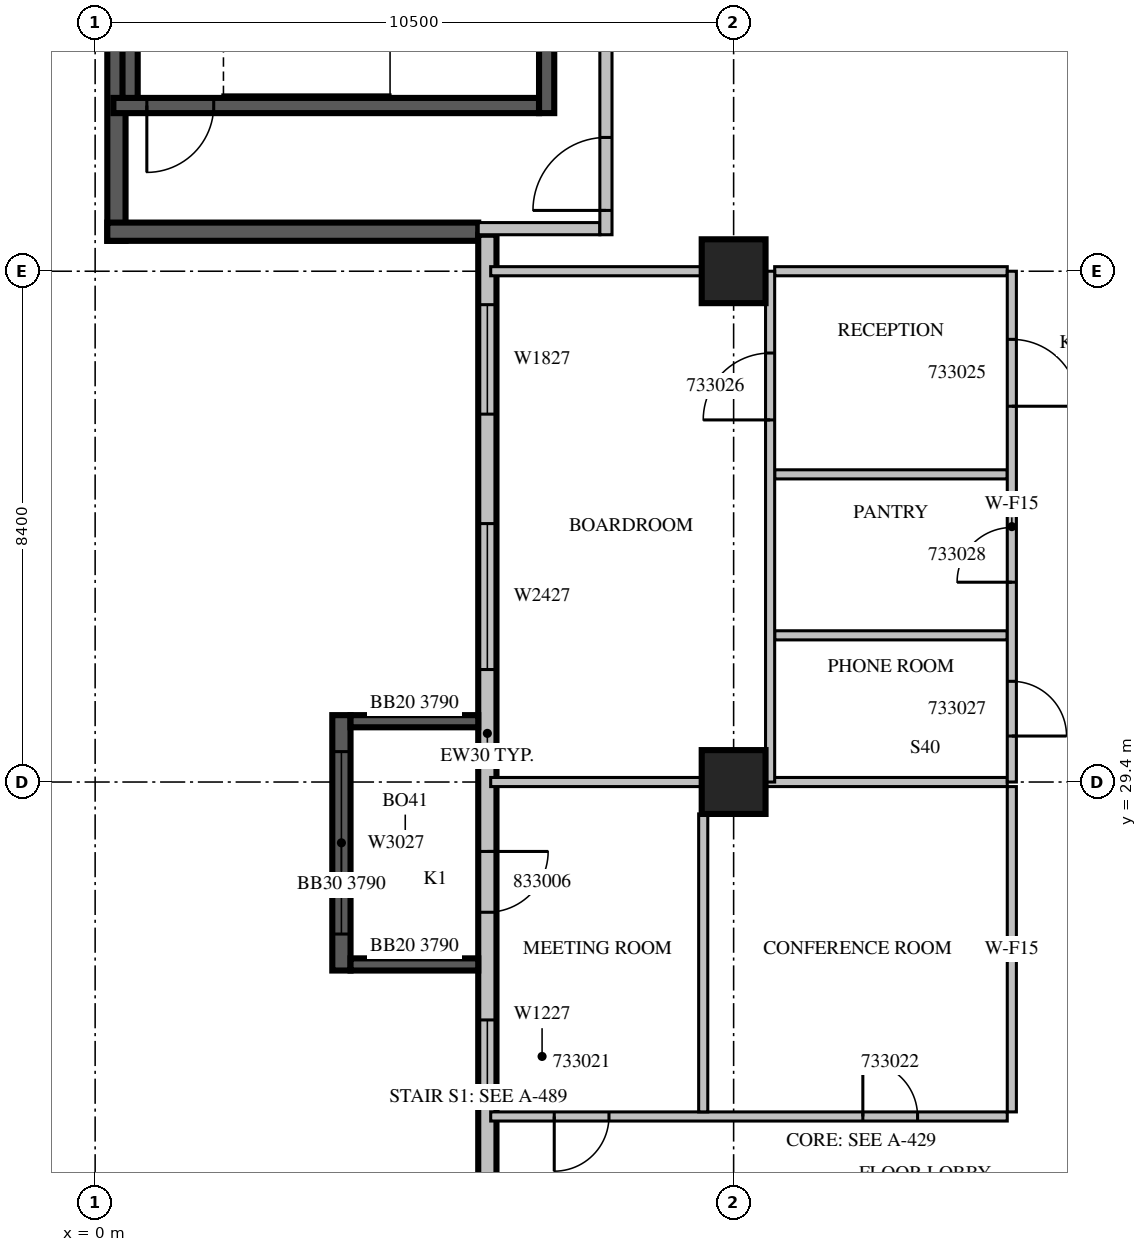
"""IFC4 building model, lengths in metres.
Left out: names, types, materials, properties, quantities, classifications, styles, units other than length and angle.
Written with IfcOpenShell. Run it as: python <this file> out.ifc"""

import sys

from ifc_helpers import new_model, si_unit, direction, frame, frame_2d, origin, origin_2d, place, context, subcontext, project, spatial, rectangle, extrude, source, transform, mapped, element, fill, save


model = new_model("IFC4")
c1 = context("Model", 3, precision=1e-05, world=origin(), true_north=direction((0.0, 1.0)))
c2 = subcontext(c1, "Body", "Model", "MODEL_VIEW")
j1 = project(units=[si_unit("LENGTHUNIT", "METRE"), si_unit("PLANEANGLEUNIT", "RADIAN")], contexts=[c1])
p1 = place(None, origin())
s1 = spatial("IfcSite", under=j1, at=p1, CompositionType="ELEMENT")
p2 = place(p1, origin())
s2 = spatial("IfcBuilding", under=s1, at=p2, CompositionType="ELEMENT")
p3 = place(p2, frame((0.0, 0.0, 149.7)))
s3 = spatial("IfcBuildingStorey", under=s2, at=p3, CompositionType="ELEMENT", Elevation=149.7)
m1 = source(origin(), c2, "Body", "SweptSolid", [
    extrude(rectangle(XDim=1.05, YDim=1.05, at=origin_2d()), origin(), (0.0, 0.0, 1.0), 4.2),
])
for number, where, z_axis, x_axis in (
    (1, (10.5, 29.4, 0.0), (0.0, 0.0, 1.0), (1.0, 0.0, 0.0)),
    (2, (10.5, 37.8, 0.0), (0.0, 0.0, 1.0), (1.0, 0.0, 0.0)),
):
    element("IfcColumn", number, at=place(p3, frame(where, z_axis=z_axis, x_axis=x_axis)), inside=s3, PredefinedType="COLUMN", context=c2, shape_type="MappedRepresentation", body=[
        mapped(m1, transform((0.0, 0.0, 0.0), scale=1.0)),
    ])
m2 = source(origin(), c2, "Body", "SweptSolid", [
    extrude(rectangle(XDim=5.65, YDim=0.3, at=frame_2d((2.825, 0.0))), origin(), (0.0, 0.0, 1.0), 3.8),
])
p4 = place(p3, frame((0.35, 43.95, 0.0), z_axis=(0.0, 0.0, 1.0), x_axis=(0.0, -1.0, 0.0)))
e3 = element("IfcWall", 3, at=p4, inside=s3, PredefinedType="SOLIDWALL", context=c2, shape_type="MappedRepresentation", body=[
    mapped(m2, transform((0.0, 0.0, 0.0), scale=1.0)),
])
m3 = source(origin(), c2, "Body", "SweptSolid", [
    extrude(rectangle(XDim=6.1, YDim=0.3, at=frame_2d((3.05, 0.0))), origin(), (0.0, 0.0, 1.0), 3.8),
])
p5 = place(p3, frame((0.2, 38.45, 0.0), z_axis=(0.0, 0.0, 1.0), x_axis=(1.0, 0.0, 0.0)))
e4 = element("IfcWall", 4, at=p5, inside=s3, PredefinedType="SOLIDWALL", context=c2, shape_type="MappedRepresentation", body=[
    mapped(m3, transform((0.0, 0.0, 0.0), scale=1.0)),
])
m4 = source(origin(), c2, "Body", "SweptSolid", [
    extrude(rectangle(XDim=16.4, YDim=0.3, at=frame_2d((8.2, 0.0))), origin(), (0.0, 0.0, 1.0), 3.8),
])
p6 = place(p3, frame((6.45, 38.4, 0.0), z_axis=(0.0, 0.0, 1.0), x_axis=(0.0, -1.0, 0.0)))
e5 = element("IfcWall", 5, at=p6, inside=s3, PredefinedType="STANDARD", context=c2, shape_type="MappedRepresentation", body=[
    mapped(m4, transform((0.0, 0.0, 0.0), scale=1.0)),
])
m5 = source(origin(), c2, "Body", "SweptSolid", [
    extrude(rectangle(XDim=1.8, YDim=2.7, at=frame_2d((0.9, 1.35))), frame((0.0, 0.16, 0.0), z_axis=(0.0, -1.0, 0.0), x_axis=(1.0, 0.0, 0.0)), (0.0, 0.0, 1.0), 0.32),
])
p7 = place(p6, frame((1.15, 0.0, 0.6)))
e6 = element("IfcOpeningElement", 6, at=p7, cuts=e5, PredefinedType="OPENING", context=c2, shape_type="MappedRepresentation", body=[
    mapped(m5, transform((0.0, 0.0, 0.0), scale=1.0)),
])
m6 = source(origin(), c2, "Body", "SweptSolid", [
    extrude(rectangle(XDim=2.4, YDim=2.7, at=frame_2d((1.2, 1.35))), frame((0.0, 0.16, 0.0), z_axis=(0.0, -1.0, 0.0), x_axis=(1.0, 0.0, 0.0)), (0.0, 0.0, 1.0), 0.32),
])
p8 = place(p6, frame((4.75, 0.0, 0.6)))
e7 = element("IfcOpeningElement", 7, at=p8, cuts=e5, PredefinedType="OPENING", context=c2, shape_type="MappedRepresentation", body=[
    mapped(m6, transform((0.0, 0.0, 0.0), scale=1.0)),
])
m7 = source(origin(), c2, "Body", "SweptSolid", [
    extrude(rectangle(XDim=1.2, YDim=2.7, at=frame_2d((0.6, 1.35))), frame((0.0, 0.16, 0.0), z_axis=(0.0, -1.0, 0.0), x_axis=(1.0, 0.0, 0.0)), (0.0, 0.0, 1.0), 0.32),
])
p9 = place(p6, frame((12.912, 0.0, 0.6)))
e8 = element("IfcOpeningElement", 8, at=p9, cuts=e5, PredefinedType="OPENING", context=c2, shape_type="MappedRepresentation", body=[
    mapped(m7, transform((0.0, 0.0, 0.0), scale=1.0)),
])
m8 = source(origin(), c2, "Body", "SweptSolid", [
    extrude(rectangle(XDim=1.0, YDim=2.1, at=frame_2d((0.5, 1.05))), frame((0.0, 0.16, 0.0), z_axis=(0.0, -1.0, 0.0), x_axis=(1.0, 0.0, 0.0)), (0.0, 0.0, 1.0), 0.32),
])
p10 = place(p6, frame((10.142, 0.0, 0.0)))
e9 = element("IfcOpeningElement", 9, at=p10, cuts=e5, PredefinedType="OPENING", context=c2, shape_type="MappedRepresentation", body=[
    mapped(m8, transform((0.0, 0.0, 0.0), scale=1.0)),
])
m9 = source(origin(), c2, "Body", "SweptSolid", [
    extrude(rectangle(XDim=4.2, YDim=0.3, at=frame_2d((2.1, 0.0))), origin(), (0.0, 0.0, 1.0), 3.79),
])
p11 = place(p3, frame((4.05, 30.5, 0.0), z_axis=(0.0, 0.0, 1.0), x_axis=(0.0, -1.0, 0.0)))
e10 = element("IfcWall", 10, at=p11, inside=s3, PredefinedType="SOLIDWALL", context=c2, shape_type="MappedRepresentation", body=[
    mapped(m9, transform((0.0, 0.0, 0.0), scale=1.0)),
])
m10 = source(origin(), c2, "Body", "SweptSolid", [
    extrude(rectangle(XDim=3.0, YDim=2.7, at=frame_2d((1.5, 1.35))), frame((0.0, 0.16, 0.0), z_axis=(0.0, -1.0, 0.0), x_axis=(1.0, 0.0, 0.0)), (0.0, 0.0, 1.0), 0.32),
])
p12 = place(p11, frame((0.6, 0.0, 0.6)))
e11 = element("IfcOpeningElement", 11, at=p12, cuts=e10, PredefinedType="OPENING", context=c2, shape_type="MappedRepresentation", body=[
    mapped(m10, transform((0.0, 0.0, 0.0), scale=1.0)),
])
m11 = source(origin(), c2, "Body", "SweptSolid", [
    extrude(rectangle(XDim=2.1, YDim=0.2, at=frame_2d((1.05, 0.0))), origin(), (0.0, 0.0, 1.0), 3.79),
])
for number, where, z_axis, x_axis in (
    (12, (6.3, 30.4, 0.0), (0.0, 0.0, 1.0), (-1.0, 0.0, 0.0)),
    (13, (6.3, 26.4, 0.0), (0.0, 0.0, 1.0), (-1.0, 0.0, 0.0)),
):
    element("IfcWall", number, at=place(p3, frame(where, z_axis=z_axis, x_axis=x_axis)), inside=s3, PredefinedType="SOLIDWALL", context=c2, shape_type="MappedRepresentation", body=[
        mapped(m11, transform((0.0, 0.0, 0.0), scale=1.0)),
    ])
m12 = source(origin(), c2, "Body", "SweptSolid", [
    extrude(rectangle(XDim=7.0, YDim=0.25, at=frame_2d((3.5, 0.0))), origin(), (0.0, 0.0, 1.0), 3.8),
])
p13 = place(p3, frame((0.3, 40.525, 0.0), z_axis=(0.0, 0.0, 1.0), x_axis=(1.0, 0.0, 0.0)))
e14 = element("IfcWall", 14, at=p13, inside=s3, PredefinedType="SOLIDWALL", context=c2, shape_type="MappedRepresentation", body=[
    mapped(m12, transform((0.0, 0.0, 0.0), scale=1.0)),
])
m13 = source(origin(), c2, "Body", "SweptSolid", [
    extrude(rectangle(XDim=1.1, YDim=2.1, at=frame_2d((0.55, 1.05))), frame((0.0, 0.135, 0.0), z_axis=(0.0, -1.0, 0.0), x_axis=(1.0, 0.0, 0.0)), (0.0, 0.0, 1.0), 0.27),
])
p14 = place(p13, frame((0.55, 0.0, 0.0)))
e15 = element("IfcOpeningElement", 15, at=p14, cuts=e14, PredefinedType="OPENING", context=c2, shape_type="MappedRepresentation", body=[
    mapped(m13, transform((0.0, 0.0, 0.0), scale=1.0)),
])
m14 = source(origin(), c2, "Body", "SweptSolid", [
    extrude(rectangle(XDim=3.45, YDim=0.25, at=frame_2d((1.725, 0.0))), origin(), (0.0, 0.0, 1.0), 3.8),
])
p15 = place(p3, frame((7.425, 40.4, 0.0), z_axis=(0.0, 0.0, 1.0), x_axis=(0.0, 1.0, 0.0)))
e16 = element("IfcWall", 16, at=p15, inside=s3, PredefinedType="SOLIDWALL", context=c2, shape_type="MappedRepresentation", body=[
    mapped(m14, transform((0.0, 0.0, 0.0), scale=1.0)),
])
m15 = source(origin(), c2, "Body", "SweptSolid", [
    extrude(rectangle(XDim=2.95, YDim=0.25, at=frame_2d((1.475, 0.0))), origin(), (0.0, 0.0, 1.0), 3.8),
])
p16 = place(p3, frame((0.575, 40.65, 0.0), z_axis=(0.0, 0.0, 1.0), x_axis=(0.0, 1.0, 0.0)))
e17 = element("IfcWall", 17, at=p16, inside=s3, PredefinedType="SOLIDWALL", context=c2, shape_type="MappedRepresentation", body=[
    mapped(m15, transform((0.0, 0.0, 0.0), scale=1.0)),
])
m16 = source(origin(), c2, "Body", "SweptSolid", [
    extrude(rectangle(XDim=2.0, YDim=0.2, at=frame_2d((1.0, 0.0))), origin(), (0.0, 0.0, 1.0), 3.8),
])
p17 = place(p3, frame((6.3, 38.5, 0.0), z_axis=(0.0, 0.0, 1.0), x_axis=(1.0, 0.0, 0.0)))
e18 = element("IfcWall", 18, at=p17, inside=s3, PredefinedType="PARTITIONING", context=c2, shape_type="MappedRepresentation", body=[
    mapped(m16, transform((0.0, 0.0, 0.0), scale=1.0)),
])
m17 = source(origin(), c2, "Body", "SweptSolid", [
    extrude(rectangle(XDim=5.45, YDim=0.2, at=frame_2d((2.725, 0.0))), origin(), (0.0, 0.0, 1.0), 3.8),
])
p18 = place(p3, frame((8.4, 38.4, 0.0), z_axis=(0.0, 0.0, 1.0), x_axis=(0.0, 1.0, 0.0)))
e19 = element("IfcWall", 19, at=p18, inside=s3, PredefinedType="PARTITIONING", context=c2, shape_type="MappedRepresentation", body=[
    mapped(m17, transform((0.0, 0.0, 0.0), scale=1.0)),
])
m18 = source(origin(), c2, "Body", "SweptSolid", [
    extrude(rectangle(XDim=1.2, YDim=2.1, at=frame_2d((0.6, 1.05))), frame((0.0, 0.11, 0.0), z_axis=(0.0, -1.0, 0.0), x_axis=(1.0, 0.0, 0.0)), (0.0, 0.0, 1.0), 0.22),
])
p19 = place(p18, frame((0.4, 0.0, 0.0)))
e20 = element("IfcOpeningElement", 20, at=p19, cuts=e19, PredefinedType="OPENING", context=c2, shape_type="MappedRepresentation", body=[
    mapped(m18, transform((0.0, 0.0, 0.0), scale=1.0)),
])
m19 = source(origin(), c2, "Body", "SweptSolid", [
    extrude(rectangle(XDim=0.9, YDim=2.1, at=frame_2d((0.45, 1.05))), frame((0.0, 0.11, 0.0), z_axis=(0.0, -1.0, 0.0), x_axis=(1.0, 0.0, 0.0)), (0.0, 0.0, 1.0), 0.22),
])
p20 = place(p18, frame((3.25, 0.0, 0.0)))
e21 = element("IfcOpeningElement", 21, at=p20, cuts=e19, PredefinedType="OPENING", context=c2, shape_type="MappedRepresentation", body=[
    mapped(m19, transform((0.0, 0.0, 0.0), scale=1.0)),
])
m20 = source(origin(), c2, "Body", "SweptSolid", [
    extrude(rectangle(XDim=8.495, YDim=0.15, at=frame_2d((4.247, 0.0))), origin(), (0.0, 0.0, 1.0), 3.8),
])
p21 = place(p3, frame((6.505, 23.9, 0.0), z_axis=(0.0, 0.0, 1.0), x_axis=(1.0, 0.0, 0.0)))
e22 = element("IfcWall", 22, at=p21, inside=s3, PredefinedType="PARTITIONING", context=c2, shape_type="MappedRepresentation", body=[
    mapped(m20, transform((0.0, 0.0, 0.0), scale=1.0)),
])
m21 = source(origin(), c2, "Body", "SweptSolid", [
    extrude(rectangle(XDim=0.9, YDim=2.1, at=frame_2d((0.45, 1.05))), frame((0.0, 0.085, 0.0), z_axis=(0.0, -1.0, 0.0), x_axis=(1.0, 0.0, 0.0)), (0.0, 0.0, 1.0), 0.17),
])
p22 = place(p21, frame((1.045, 0.0, 0.0)))
e23 = element("IfcOpeningElement", 23, at=p22, cuts=e22, PredefinedType="OPENING", context=c2, shape_type="MappedRepresentation", body=[
    mapped(m21, transform((0.0, 0.0, 0.0), scale=1.0)),
])
p23 = place(p21, frame((6.12, 0.0, 0.0)))
e24 = element("IfcOpeningElement", 24, at=p23, cuts=e22, PredefinedType="OPENING", context=c2, shape_type="MappedRepresentation", body=[
    mapped(m21, transform((0.0, 0.0, 0.0), scale=1.0)),
])
p24 = place(p3, frame((10.0, 23.975, 0.0), z_axis=(0.0, 0.0, 1.0), x_axis=(0.0, 1.0, 0.0)))
e25 = element("IfcWall", 25, at=p24, inside=s3, PredefinedType="PARTITIONING", context=c2, shape_type="SweptSolid", body=[
    extrude(rectangle(XDim=4.901, YDim=0.15, at=frame_2d((2.45, 0.0))), origin(), (0.0, 0.0, 1.0), 3.8),
])
m22 = source(origin(), c2, "Body", "SweptSolid", [
    extrude(rectangle(XDim=5.35, YDim=0.15, at=frame_2d((2.675, 0.0))), origin(), (0.0, 0.0, 1.0), 3.8),
])
p25 = place(p3, frame((15.075, 23.975, 0.0), z_axis=(0.0, 0.0, 1.0), x_axis=(0.0, 1.0, 0.0)))
e26 = element("IfcWall", 26, at=p25, inside=s3, PredefinedType="PARTITIONING", context=c2, shape_type="MappedRepresentation", body=[
    mapped(m22, transform((0.0, 0.0, 0.0), scale=1.0)),
])
m23 = source(origin(), c2, "Body", "SweptSolid", [
    extrude(rectangle(XDim=3.471, YDim=0.15, at=frame_2d((1.736, 0.0))), origin(), (0.0, 0.0, 1.0), 3.8),
])
p26 = place(p3, frame((9.976, 29.4, 0.0), z_axis=(0.0, 0.0, 1.0), x_axis=(-1.0, 0.0, 0.0)))
e27 = element("IfcWall", 27, at=p26, inside=s3, PredefinedType="PARTITIONING", context=c2, shape_type="MappedRepresentation", body=[
    mapped(m23, transform((0.0, 0.0, 0.0), scale=1.0)),
])
m24 = source(origin(), c2, "Body", "SweptSolid", [
    extrude(rectangle(XDim=3.976, YDim=0.15, at=frame_2d((1.988, 0.0))), origin(), (0.0, 0.0, 1.0), 3.8),
])
p27 = place(p3, frame((15.0, 29.4, 0.0), z_axis=(0.0, 0.0, 1.0), x_axis=(-1.0, 0.0, 0.0)))
e28 = element("IfcWall", 28, at=p27, inside=s3, PredefinedType="PARTITIONING", context=c2, shape_type="MappedRepresentation", body=[
    mapped(m24, transform((0.0, 0.0, 0.0), scale=1.0)),
])
m25 = source(origin(), c2, "Body", "SweptSolid", [
    extrude(rectangle(XDim=3.825, YDim=0.15, at=frame_2d((1.913, 0.0))), origin(), (0.0, 0.0, 1.0), 3.8),
])
for number, where, z_axis, x_axis in (
    (29, (15.0, 31.812, 0.0), (0.0, 0.0, 1.0), (-1.0, 0.0, 0.0)),
    (30, (15.0, 34.459, 0.0), (0.0, 0.0, 1.0), (-1.0, 0.0, 0.0)),
):
    element("IfcWall", number, at=place(p3, frame(where, z_axis=z_axis, x_axis=x_axis)), inside=s3, PredefinedType="PARTITIONING", context=c2, shape_type="MappedRepresentation", body=[
        mapped(m25, transform((0.0, 0.0, 0.0), scale=1.0)),
    ])
p28 = place(p3, frame((9.976, 37.8, 0.0), z_axis=(0.0, 0.0, 1.0), x_axis=(-1.0, 0.0, 0.0)))
e31 = element("IfcWall", 31, at=p28, inside=s3, PredefinedType="PARTITIONING", context=c2, shape_type="MappedRepresentation", body=[
    mapped(m23, transform((0.0, 0.0, 0.0), scale=1.0)),
])
p29 = place(p3, frame((15.0, 37.8, 0.0), z_axis=(0.0, 0.0, 1.0), x_axis=(-1.0, 0.0, 0.0)))
e32 = element("IfcWall", 32, at=p29, inside=s3, PredefinedType="PARTITIONING", context=c2, shape_type="MappedRepresentation", body=[
    mapped(m25, transform((0.0, 0.0, 0.0), scale=1.0)),
])
m26 = source(origin(), c2, "Body", "SweptSolid", [
    extrude(rectangle(XDim=8.4, YDim=0.15, at=frame_2d((4.2, 0.0))), origin(), (0.0, 0.0, 1.0), 3.8),
])
p30 = place(p3, frame((11.1, 29.4, 0.0), z_axis=(0.0, 0.0, 1.0), x_axis=(0.0, 1.0, 0.0)))
e33 = element("IfcWall", 33, at=p30, inside=s3, PredefinedType="PARTITIONING", context=c2, shape_type="MappedRepresentation", body=[
    mapped(m26, transform((0.0, 0.0, 0.0), scale=1.0)),
])
m27 = source(origin(), c2, "Body", "SweptSolid", [
    extrude(rectangle(XDim=1.1, YDim=2.1, at=frame_2d((0.55, 1.05))), frame((0.0, 0.085, 0.0), z_axis=(0.0, -1.0, 0.0), x_axis=(1.0, 0.0, 0.0)), (0.0, 0.0, 1.0), 0.17),
])
p31 = place(p30, frame((5.955, 0.0, 0.0)))
e34 = element("IfcOpeningElement", 34, at=p31, cuts=e33, PredefinedType="OPENING", context=c2, shape_type="MappedRepresentation", body=[
    mapped(m27, transform((0.0, 0.0, 0.0), scale=1.0)),
])
p32 = place(p3, frame((15.075, 29.4, 0.0), z_axis=(0.0, 0.0, 1.0), x_axis=(0.0, 1.0, 0.0)))
e35 = element("IfcWall", 35, at=p32, inside=s3, PredefinedType="PARTITIONING", context=c2, shape_type="MappedRepresentation", body=[
    mapped(m26, transform((0.0, 0.0, 0.0), scale=1.0)),
])
p33 = place(p32, frame((6.18, 0.0, 0.0)))
e36 = element("IfcOpeningElement", 36, at=p33, cuts=e35, PredefinedType="OPENING", context=c2, shape_type="MappedRepresentation", body=[
    mapped(m27, transform((0.0, 0.0, 0.0), scale=1.0)),
])
p34 = place(p32, frame((0.756, 0.0, 0.0)))
e37 = element("IfcOpeningElement", 37, at=p34, cuts=e35, PredefinedType="OPENING", context=c2, shape_type="MappedRepresentation", body=[
    mapped(m21, transform((0.0, 0.0, 0.0), scale=1.0)),
])
p35 = place(p32, frame((3.286, 0.0, 0.0)))
e38 = element("IfcOpeningElement", 38, at=p35, cuts=e35, PredefinedType="OPENING", context=c2, shape_type="MappedRepresentation", body=[
    mapped(m21, transform((0.0, 0.0, 0.0), scale=1.0)),
])
m28 = source(origin(), c2, "Body", "SweptSolid", [
    extrude(rectangle(XDim=1.8, YDim=2.7, at=frame_2d((0.9, 1.35))), frame((0.0, 0.03, 0.0), z_axis=(0.0, -1.0, 0.0), x_axis=(1.0, 0.0, 0.0)), (0.0, 0.0, 1.0), 0.06),
])
p36 = place(p7, origin())
e39 = element("IfcWindow", 39, at=p36, inside=s3, PartitioningType="SINGLE_PANEL", PredefinedType="WINDOW", context=c2, shape_type="MappedRepresentation", body=[
    mapped(m28, transform((0.0, 0.0, 0.0), scale=1.0)),
])
fill(e6, e39)
m29 = source(origin(), c2, "Body", "SweptSolid", [
    extrude(rectangle(XDim=2.4, YDim=2.7, at=frame_2d((1.2, 1.35))), frame((0.0, 0.03, 0.0), z_axis=(0.0, -1.0, 0.0), x_axis=(1.0, 0.0, 0.0)), (0.0, 0.0, 1.0), 0.06),
])
p37 = place(p8, origin())
e40 = element("IfcWindow", 40, at=p37, inside=s3, PartitioningType="SINGLE_PANEL", PredefinedType="WINDOW", context=c2, shape_type="MappedRepresentation", body=[
    mapped(m29, transform((0.0, 0.0, 0.0), scale=1.0)),
])
fill(e7, e40)
m30 = source(origin(), c2, "Body", "SweptSolid", [
    extrude(rectangle(XDim=1.2, YDim=2.7, at=frame_2d((0.6, 1.35))), frame((0.0, 0.03, 0.0), z_axis=(0.0, -1.0, 0.0), x_axis=(1.0, 0.0, 0.0)), (0.0, 0.0, 1.0), 0.06),
])
p38 = place(p9, origin())
e41 = element("IfcWindow", 41, at=p38, inside=s3, PartitioningType="SINGLE_PANEL", PredefinedType="WINDOW", context=c2, shape_type="MappedRepresentation", body=[
    mapped(m30, transform((0.0, 0.0, 0.0), scale=1.0)),
])
fill(e8, e41)
m31 = source(origin(), c2, "Body", "SweptSolid", [
    extrude(rectangle(XDim=3.0, YDim=2.7, at=frame_2d((1.5, 1.35))), frame((0.0, 0.03, 0.0), z_axis=(0.0, -1.0, 0.0), x_axis=(1.0, 0.0, 0.0)), (0.0, 0.0, 1.0), 0.06),
])
p39 = place(p12, origin())
e42 = element("IfcWindow", 42, at=p39, inside=s3, PartitioningType="SINGLE_PANEL", PredefinedType="WINDOW", context=c2, shape_type="MappedRepresentation", body=[
    mapped(m31, transform((0.0, 0.0, 0.0), scale=1.0)),
])
fill(e11, e42)
m32 = source(origin(), c2, "Body", "SweptSolid", [
    extrude(rectangle(XDim=1.1, YDim=2.1, at=frame_2d((0.55, 1.05))), frame((0.0, 0.025, 0.0), z_axis=(0.0, -1.0, 0.0), x_axis=(1.0, 0.0, 0.0)), (0.0, 0.0, 1.0), 0.05),
])
p40 = place(p14, origin())
e43 = element("IfcDoor", 43, at=p40, inside=s3, OperationType="SINGLE_SWING_RIGHT", PredefinedType="DOOR", context=c2, shape_type="MappedRepresentation", body=[
    mapped(m32, transform((0.0, 0.0, 0.0), scale=1.0)),
])
fill(e15, e43)
m33 = source(origin(), c2, "Body", "SweptSolid", [
    extrude(rectangle(XDim=1.2, YDim=2.1, at=frame_2d((0.6, 1.05))), frame((0.0, 0.025, 0.0), z_axis=(0.0, -1.0, 0.0), x_axis=(1.0, 0.0, 0.0)), (0.0, 0.0, 1.0), 0.05),
])
p41 = place(p19, origin())
e44 = element("IfcDoor", 44, at=p41, inside=s3, OperationType="SINGLE_SWING_LEFT", PredefinedType="DOOR", context=c2, shape_type="MappedRepresentation", body=[
    mapped(m33, transform((0.0, 0.0, 0.0), scale=1.0)),
])
fill(e20, e44)
m34 = source(origin(), c2, "Body", "SweptSolid", [
    extrude(rectangle(XDim=0.9, YDim=2.1, at=frame_2d((0.45, 1.05))), frame((0.0, 0.025, 0.0), z_axis=(0.0, -1.0, 0.0), x_axis=(1.0, 0.0, 0.0)), (0.0, 0.0, 1.0), 0.05),
])
p42 = place(p22, origin())
e45 = element("IfcDoor", 45, at=p42, inside=s3, OperationType="SINGLE_SWING_RIGHT", PredefinedType="DOOR", context=c2, shape_type="MappedRepresentation", body=[
    mapped(m34, transform((0.0, 0.0, 0.0), scale=1.0)),
])
fill(e23, e45)
p43 = place(p23, origin())
e46 = element("IfcDoor", 46, at=p43, inside=s3, OperationType="SINGLE_SWING_LEFT", PredefinedType="DOOR", context=c2, shape_type="MappedRepresentation", body=[
    mapped(m34, transform((0.0, 0.0, 0.0), scale=1.0)),
])
fill(e24, e46)
p44 = place(p33, origin())
e47 = element("IfcDoor", 47, at=p44, inside=s3, OperationType="SINGLE_SWING_RIGHT", PredefinedType="DOOR", context=c2, shape_type="MappedRepresentation", body=[
    mapped(m32, transform((0.0, 0.0, 0.0), scale=1.0)),
])
fill(e36, e47)
p45 = place(p31, origin())
e48 = element("IfcDoor", 48, at=p45, inside=s3, OperationType="SINGLE_SWING_LEFT", PredefinedType="DOOR", context=c2, shape_type="MappedRepresentation", body=[
    mapped(m32, transform((0.0, 0.0, 0.0), scale=1.0)),
])
fill(e34, e48)
p46 = place(p34, origin())
e49 = element("IfcDoor", 49, at=p46, inside=s3, OperationType="SINGLE_SWING_RIGHT", PredefinedType="DOOR", context=c2, shape_type="MappedRepresentation", body=[
    mapped(m34, transform((0.0, 0.0, 0.0), scale=1.0)),
])
fill(e37, e49)
p47 = place(p35, origin())
e50 = element("IfcDoor", 50, at=p47, inside=s3, OperationType="SINGLE_SWING_LEFT", PredefinedType="DOOR", context=c2, shape_type="MappedRepresentation", body=[
    mapped(m34, transform((0.0, 0.0, 0.0), scale=1.0)),
])
fill(e38, e50)
m35 = source(origin(), c2, "Body", "SweptSolid", [
    extrude(rectangle(XDim=1.0, YDim=2.1, at=frame_2d((0.5, 1.05))), frame((0.0, 0.025, 0.0), z_axis=(0.0, -1.0, 0.0), x_axis=(1.0, 0.0, 0.0)), (0.0, 0.0, 1.0), 0.05),
])
p48 = place(p10, origin())
e51 = element("IfcDoor", 51, at=p48, inside=s3, OperationType="SINGLE_SWING_LEFT", PredefinedType="DOOR", context=c2, shape_type="MappedRepresentation", body=[
    mapped(m35, transform((0.0, 0.0, 0.0), scale=1.0)),
])
fill(e9, e51)
save(model, sys.argv[1])
